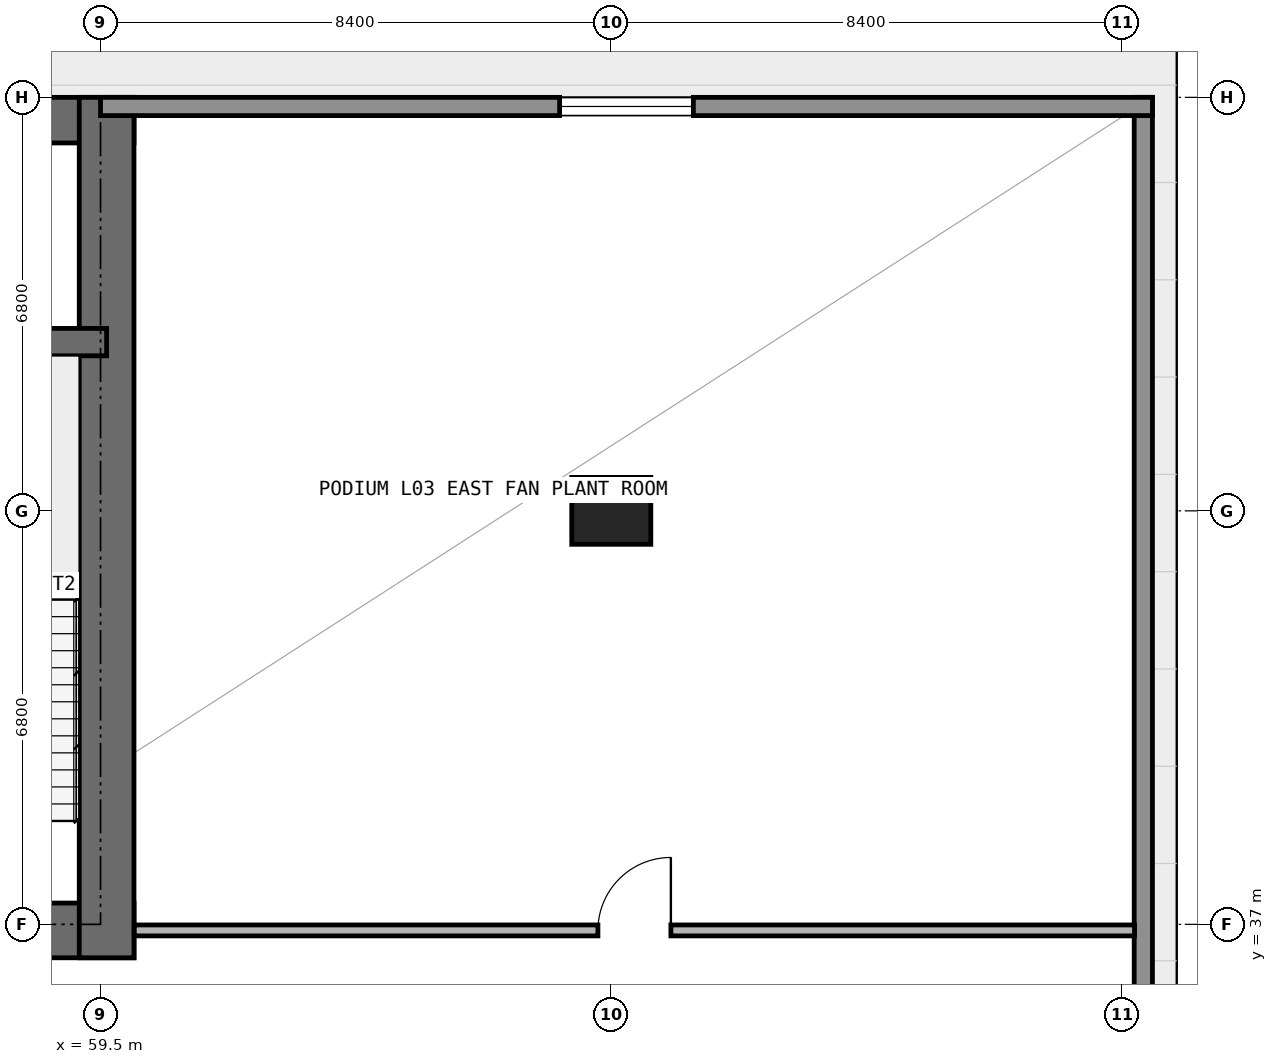
"""IFC4 building model, lengths in metres.
Left out: names, types, materials, properties, quantities, classifications, styles, units other than length and angle.
Written with IfcOpenShell. Run it as: python <this file> out.ifc"""

import sys

from ifc_helpers import new_model, si_unit, direction, frame, frame_2d, origin, origin_2d, place, context, subcontext, project, spatial, rectangle, extrude, element, fill, save


model = new_model("IFC4")
c1 = context("Model", 3, precision=1e-05, world=origin(), true_north=direction((0.0, 1.0)))
c2 = subcontext(c1, "Body", "Model", "MODEL_VIEW")
j1 = project(units=[si_unit("LENGTHUNIT", "METRE"), si_unit("PLANEANGLEUNIT", "RADIAN")], contexts=[c1])
p1 = place(None, origin())
s1 = spatial("IfcSite", under=j1, at=p1, CompositionType="ELEMENT")
p2 = place(p1, origin())
s2 = spatial("IfcBuilding", under=s1, at=p2, CompositionType="ELEMENT")
p3 = place(p2, frame((0.0, 0.0, 15.0)))
s3 = spatial("IfcBuildingStorey", under=s2, at=p3, CompositionType="ELEMENT", Elevation=15.0)
p4 = place(p3, frame((67.9, 43.8, 0.0), z_axis=(0.0, 0.0, 1.0), x_axis=(1.0, 0.0, 0.0)))
e1 = element("IfcColumn", 1, at=p4, inside=s3, PredefinedType="COLUMN", context=c2, shape_type="SweptSolid", body=[
    extrude(rectangle(XDim=1.3, YDim=1.1, at=origin_2d()), origin(), (0.0, 0.0, 1.0), 4.5),
])
p5 = place(p3, frame((17.75, 36.9, 0.0), z_axis=(0.0, 0.0, 1.0), x_axis=(1.0, 0.0, 0.0)))
e2 = element("IfcWall", 2, at=p5, inside=s3, PredefinedType="SHEAR", context=c2, shape_type="SweptSolid", body=[
    extrude(rectangle(XDim=42.3, YDim=0.9, at=frame_2d((21.15, 0.0))), origin(), (0.0, 0.0, 1.0), 4.5),
])
p6 = place(p5, frame((14.55, 0.0, 0.0)))
e3 = element("IfcOpeningElement", 3, at=p6, cuts=e2, PredefinedType="OPENING", context=c2, shape_type="SweptSolid", body=[
    extrude(rectangle(XDim=1.1, YDim=2.15, at=frame_2d((0.55, 1.075))), frame((0.0, 0.46, 0.0), z_axis=(0.0, -1.0, 0.0), x_axis=(1.0, 0.0, 0.0)), (0.0, 0.0, 1.0), 0.92),
])
p7 = place(p5, frame((6.4, 0.0, 0.0)))
e4 = element("IfcOpeningElement", 4, at=p7, cuts=e2, PredefinedType="OPENING", context=c2, shape_type="SweptSolid", body=[
    extrude(rectangle(XDim=1.05, YDim=2.15, at=frame_2d((0.525, 1.075))), frame((0.0, 0.46, 0.0), z_axis=(0.0, -1.0, 0.0), x_axis=(1.0, 0.0, 0.0)), (0.0, 0.0, 1.0), 0.92),
])
p8 = place(p5, frame((34.9, 0.0, 0.0)))
e5 = element("IfcOpeningElement", 5, at=p8, cuts=e2, PredefinedType="OPENING", context=c2, shape_type="SweptSolid", body=[
    extrude(rectangle(XDim=1.05, YDim=2.15, at=frame_2d((0.525, 1.075))), frame((0.0, 0.46, 0.0), z_axis=(0.0, -1.0, 0.0), x_axis=(1.0, 0.0, 0.0)), (0.0, 0.0, 1.0), 0.92),
])
p9 = place(p5, frame((11.012, 0.0, 0.0)))
e6 = element("IfcOpeningElement", 6, at=p9, cuts=e2, PredefinedType="OPENING", context=c2, shape_type="SweptSolid", body=[
    extrude(rectangle(XDim=1.05, YDim=2.15, at=frame_2d((0.525, 1.075))), frame((0.0, 0.46, 0.0), z_axis=(0.0, -1.0, 0.0), x_axis=(1.0, 0.0, 0.0)), (0.0, 0.0, 1.0), 0.92),
])
p10 = place(p5, frame((24.25, 0.0, 0.0)))
e7 = element("IfcOpeningElement", 7, at=p10, cuts=e2, PredefinedType="OPENING", context=c2, shape_type="SweptSolid", body=[
    extrude(rectangle(XDim=1.05, YDim=2.15, at=frame_2d((0.525, 1.075))), frame((0.0, 0.46, 0.0), z_axis=(0.0, -1.0, 0.0), x_axis=(1.0, 0.0, 0.0)), (0.0, 0.0, 1.0), 0.92),
])
p11 = place(p3, frame((17.75, 50.225, 0.0), z_axis=(0.0, 0.0, 1.0), x_axis=(1.0, 0.0, 0.0)))
e8 = element("IfcWall", 8, at=p11, inside=s3, PredefinedType="SHEAR", context=c2, shape_type="SweptSolid", body=[
    extrude(rectangle(XDim=42.3, YDim=0.75, at=frame_2d((21.15, 0.0))), origin(), (0.0, 0.0, 1.0), 4.5),
])
p12 = place(p3, frame((59.6, 36.45, 0.0), z_axis=(0.0, 0.0, 1.0), x_axis=(0.0, 1.0, 0.0)))
e9 = element("IfcWall", 9, at=p12, inside=s3, PredefinedType="SHEAR", context=c2, shape_type="SweptSolid", body=[
    extrude(rectangle(XDim=14.15, YDim=0.9, at=frame_2d((7.075, 0.0))), origin(), (0.0, 0.0, 1.0), 4.5),
])
p13 = place(p3, frame((18.2, 46.575, 0.0), z_axis=(0.0, 0.0, 1.0), x_axis=(1.0, 0.0, 0.0)))
e10 = element("IfcWall", 10, at=p13, inside=s3, PredefinedType="SHEAR", context=c2, shape_type="SweptSolid", body=[
    extrude(rectangle(XDim=41.4, YDim=0.45, at=frame_2d((20.7, 0.0))), origin(), (0.0, 0.0, 1.0), 4.5),
])
p14 = place(p13, frame((7.7, 0.0, 0.0)))
e11 = element("IfcOpeningElement", 11, at=p14, cuts=e10, PredefinedType="OPENING", context=c2, shape_type="SweptSolid", body=[
    extrude(rectangle(XDim=1.0, YDim=2.2, at=frame_2d((0.5, 1.1))), frame((0.0, 0.235, 0.0), z_axis=(0.0, -1.0, 0.0), x_axis=(1.0, 0.0, 0.0)), (0.0, 0.0, 1.0), 0.47),
])
p15 = place(p13, frame((32.725, 0.0, 0.0)))
e12 = element("IfcOpeningElement", 12, at=p15, cuts=e10, PredefinedType="OPENING", context=c2, shape_type="SweptSolid", body=[
    extrude(rectangle(XDim=1.05, YDim=2.15, at=frame_2d((0.525, 1.075))), frame((0.0, 0.235, 0.0), z_axis=(0.0, -1.0, 0.0), x_axis=(1.0, 0.0, 0.0)), (0.0, 0.0, 1.0), 0.47),
])
p16 = place(p3, frame((76.65, 50.6, 0.0), z_axis=(0.0, 0.0, 1.0), x_axis=(0.0, -1.0, 0.0)))
e13 = element("IfcWall", 13, at=p16, inside=s3, PredefinedType="STANDARD", context=c2, shape_type="SweptSolid", body=[
    extrude(rectangle(XDim=24.4, YDim=0.3, at=frame_2d((12.2, 0.0))), origin(), (0.0, 0.0, 1.0), 4.5),
])
p17 = place(p3, frame((59.5, 50.45, 0.0), z_axis=(0.0, 0.0, 1.0), x_axis=(1.0, 0.0, 0.0)))
e14 = element("IfcWall", 14, at=p17, inside=s3, PredefinedType="STANDARD", context=c2, shape_type="SweptSolid", body=[
    extrude(rectangle(XDim=17.3, YDim=0.3, at=frame_2d((8.65, 0.0))), origin(), (0.0, 0.0, 1.0), 4.5),
])
p18 = place(p17, frame((7.55, 0.0, 0.85)))
e15 = element("IfcOpeningElement", 15, at=p18, cuts=e14, PredefinedType="OPENING", context=c2, shape_type="SweptSolid", body=[
    extrude(rectangle(XDim=2.2, YDim=1.55, at=frame_2d((1.1, 0.775))), frame((0.0, 0.16, 0.0), z_axis=(0.0, -1.0, 0.0), x_axis=(1.0, 0.0, 0.0)), (0.0, 0.0, 1.0), 0.32),
])
p19 = place(p3, frame((60.055, 36.9, 0.0), z_axis=(0.0, 0.0, 1.0), x_axis=(1.0, 0.0, 0.0)))
e16 = element("IfcWall", 16, at=p19, inside=s3, PredefinedType="PARTITIONING", context=c2, shape_type="SweptSolid", body=[
    extrude(rectangle(XDim=16.45, YDim=0.18, at=frame_2d((8.225, 0.0))), origin(), (0.0, 0.0, 1.0), 4.5),
])
p20 = place(p19, frame((7.625, 0.0, 0.0)))
e17 = element("IfcOpeningElement", 17, at=p20, cuts=e16, PredefinedType="OPENING", context=c2, shape_type="SweptSolid", body=[
    extrude(rectangle(XDim=1.2, YDim=2.2, at=frame_2d((0.6, 1.1))), frame((0.0, 0.1, 0.0), z_axis=(0.0, -1.0, 0.0), x_axis=(1.0, 0.0, 0.0)), (0.0, 0.0, 1.0), 0.2),
])
p21 = place(p18, origin())
e18 = element("IfcWindow", 18, at=p21, inside=s3, PartitioningType="SINGLE_PANEL", PredefinedType="WINDOW", context=c2, shape_type="SweptSolid", body=[
    extrude(rectangle(XDim=2.2, YDim=1.55, at=frame_2d((1.1, 0.775))), frame((0.0, 0.03, 0.0), z_axis=(0.0, -1.0, 0.0), x_axis=(1.0, 0.0, 0.0)), (0.0, 0.0, 1.0), 0.06),
])
fill(e15, e18)
p22 = place(p20, origin())
e19 = element("IfcDoor", 19, at=p22, inside=s3, OperationType="SINGLE_SWING_RIGHT", PredefinedType="DOOR", context=c2, shape_type="SweptSolid", body=[
    extrude(rectangle(XDim=1.2, YDim=2.2, at=frame_2d((0.6, 1.1))), frame((0.0, 0.025, 0.0), z_axis=(0.0, -1.0, 0.0), x_axis=(1.0, 0.0, 0.0)), (0.0, 0.0, 1.0), 0.05),
])
fill(e17, e19)
save(model, sys.argv[1])
